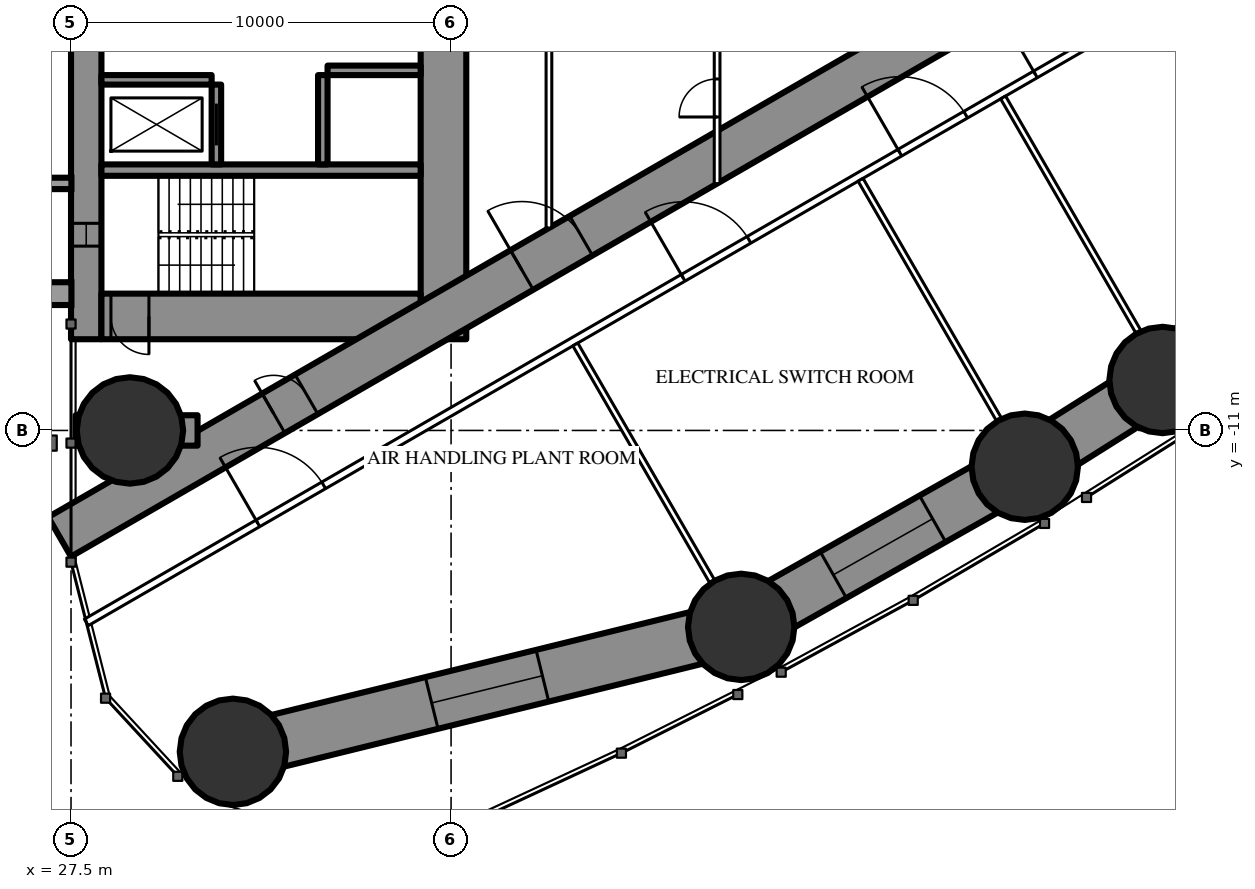
"""IFC4 building model, lengths in metres.
Left out: names, types, materials, properties, quantities, classifications, styles, units other than length and angle.
Written with IfcOpenShell. Run it as: python <this file> out.ifc"""

import sys

from ifc_helpers import new_model, si_unit, direction, frame, frame_2d, origin, origin_2d, place, context, subcontext, project, spatial, rectangle, circle, extrude, element, fill, save


model = new_model("IFC4")
c1 = context("Model", 3, precision=1e-05, world=origin(), true_north=direction((0.0, 1.0)))
c2 = subcontext(c1, "Body", "Model", "MODEL_VIEW")
j1 = project(units=[si_unit("LENGTHUNIT", "METRE"), si_unit("PLANEANGLEUNIT", "RADIAN")], contexts=[c1])
p1 = place(None, origin())
s1 = spatial("IfcSite", under=j1, at=p1, CompositionType="ELEMENT")
p2 = place(p1, origin())
s2 = spatial("IfcBuilding", under=s1, at=p2, CompositionType="ELEMENT")
p3 = place(p2, frame((0.0, 0.0, 201.8)))
s3 = spatial("IfcBuildingStorey", under=s2, at=p3, CompositionType="ELEMENT", Elevation=201.8)
for number, where, z_axis, x_axis in (
    (1, (31.76, -19.456, 0.0), (0.0, 0.0, 1.0), (1.0, 0.0, 0.0)),
    (2, (29.05, -11.0, 0.0), (0.0, 0.0, 1.0), (1.0, 0.0, 0.0)),
    (3, (45.134, -16.168, 0.0), (0.0, 0.0, 1.0), (1.0, 0.0, 0.0)),
    (4, (52.594, -11.955, 0.0), (0.0, 0.0, 1.0), (1.0, 0.0, 0.0)),
    (5, (56.221, -9.672, 0.0), (0.0, 0.0, 1.0), (1.0, 0.0, 0.0)),
):
    element("IfcColumn", number, at=place(p3, frame(where, z_axis=z_axis, x_axis=x_axis)), inside=s3, PredefinedType="COLUMN", context=c2, shape_type="SweptSolid", body=[
        extrude(circle(Radius=1.4, at=origin_2d()), origin(), (0.0, 0.0, 1.0), 3.5),
    ])
p4 = place(p3, frame((27.9, -8.6, 0.0), z_axis=(0.0, 0.0, 1.0), x_axis=(0.0, 1.0, 0.0)))
e6 = element("IfcWall", 6, at=p4, inside=s3, PredefinedType="SHEAR", context=c2, shape_type="SweptSolid", body=[
    extrude(rectangle(XDim=17.2, YDim=0.8, at=frame_2d((8.6, 0.0))), origin(), (0.0, 0.0, 1.0), 3.5),
])
p5 = place(p4, frame((2.45, 0.0, 0.6)))
e7 = element("IfcOpeningElement", 7, at=p5, cuts=e6, PredefinedType="OPENING", context=c2, shape_type="SweptSolid", body=[
    extrude(rectangle(XDim=0.6, YDim=2.1, at=frame_2d((0.3, 1.05))), frame((0.0, 0.41, 0.0), z_axis=(0.0, -1.0, 0.0), x_axis=(1.0, 0.0, 0.0)), (0.0, 0.0, 1.0), 0.82),
])
p6 = place(p4, frame((14.15, 0.0, 0.6)))
e8 = element("IfcOpeningElement", 8, at=p6, cuts=e6, PredefinedType="OPENING", context=c2, shape_type="SweptSolid", body=[
    extrude(rectangle(XDim=0.6, YDim=2.1, at=frame_2d((0.3, 1.05))), frame((0.0, 0.41, 0.0), z_axis=(0.0, -1.0, 0.0), x_axis=(1.0, 0.0, 0.0)), (0.0, 0.0, 1.0), 0.82),
])
p7 = place(p3, frame((37.3, -8.6, 0.0), z_axis=(0.0, 0.0, 1.0), x_axis=(0.0, 1.0, 0.0)))
e9 = element("IfcWall", 9, at=p7, inside=s3, PredefinedType="SHEAR", context=c2, shape_type="SweptSolid", body=[
    extrude(rectangle(XDim=17.2, YDim=1.2, at=frame_2d((8.6, 0.0))), origin(), (0.0, 0.0, 1.0), 3.5),
])
p8 = place(p7, frame((7.7, 0.0, 0.0)))
e10 = element("IfcOpeningElement", 10, at=p8, cuts=e9, PredefinedType="OPENING", context=c2, shape_type="SweptSolid", body=[
    extrude(rectangle(XDim=1.8, YDim=2.2, at=frame_2d((0.9, 1.1))), frame((0.0, 0.61, 0.0), z_axis=(0.0, -1.0, 0.0), x_axis=(1.0, 0.0, 0.0)), (0.0, 0.0, 1.0), 1.22),
])
p9 = place(p3, frame((28.3, -8.0, 0.0), z_axis=(0.0, 0.0, 1.0), x_axis=(1.0, 0.0, 0.0)))
e11 = element("IfcWall", 11, at=p9, inside=s3, PredefinedType="SHEAR", context=c2, shape_type="SweptSolid", body=[
    extrude(rectangle(XDim=8.4, YDim=1.2, at=frame_2d((4.2, 0.0))), origin(), (0.0, 0.0, 1.0), 3.5),
])
p10 = place(p9, frame((0.25, 0.0, 0.0)))
e12 = element("IfcOpeningElement", 12, at=p10, cuts=e11, PredefinedType="OPENING", context=c2, shape_type="SweptSolid", body=[
    extrude(rectangle(XDim=1.0, YDim=2.2, at=frame_2d((0.5, 1.1))), frame((0.0, 0.61, 0.0), z_axis=(0.0, -1.0, 0.0), x_axis=(1.0, 0.0, 0.0)), (0.0, 0.0, 1.0), 1.22),
])
p11 = place(p3, frame((28.3, -4.15, 0.0), z_axis=(0.0, 0.0, 1.0), x_axis=(1.0, 0.0, 0.0)))
e13 = element("IfcWall", 13, at=p11, inside=s3, PredefinedType="SHEAR", context=c2, shape_type="SweptSolid", body=[
    extrude(rectangle(XDim=8.4, YDim=0.3, at=frame_2d((4.2, 0.0))), origin(), (0.0, 0.0, 1.0), 3.5),
])
p12 = place(p3, frame((31.325, -4.0, 0.0), z_axis=(0.0, 0.0, 1.0), x_axis=(0.0, 1.0, 0.0)))
e14 = element("IfcWall", 14, at=p12, inside=s3, PredefinedType="SHEAR", context=c2, shape_type="SweptSolid", body=[
    extrude(rectangle(XDim=2.1, YDim=0.25, at=frame_2d((1.05, 0.0))), origin(), (0.0, 0.0, 1.0), 3.5),
])
p13 = place(p12, frame((0.5, 0.0, 0.0)))
e15 = element("IfcOpeningElement", 15, at=p13, cuts=e14, PredefinedType="OPENING", context=c2, shape_type="SweptSolid", body=[
    extrude(rectangle(XDim=1.1, YDim=2.2, at=frame_2d((0.55, 1.1))), frame((0.0, 0.135, 0.0), z_axis=(0.0, -1.0, 0.0), x_axis=(1.0, 0.0, 0.0)), (0.0, 0.0, 1.0), 0.27),
])
p14 = place(p3, frame((34.125, -4.0, 0.0), z_axis=(0.0, 0.0, 1.0), x_axis=(0.0, 1.0, 0.0)))
e16 = element("IfcWall", 16, at=p14, inside=s3, PredefinedType="SHEAR", context=c2, shape_type="SweptSolid", body=[
    extrude(rectangle(XDim=2.35, YDim=0.25, at=frame_2d((1.175, 0.0))), origin(), (0.0, 0.0, 1.0), 3.5),
])
p15 = place(p3, frame((28.3, -1.775, 0.0), z_axis=(0.0, 0.0, 1.0), x_axis=(1.0, 0.0, 0.0)))
e17 = element("IfcWall", 17, at=p15, inside=s3, PredefinedType="SHEAR", context=c2, shape_type="SweptSolid", body=[
    extrude(rectangle(XDim=2.9, YDim=0.25, at=frame_2d((1.45, 0.0))), origin(), (0.0, 0.0, 1.0), 3.5),
])
p16 = place(p3, frame((34.25, -1.525, 0.0), z_axis=(0.0, 0.0, 1.0), x_axis=(1.0, 0.0, 0.0)))
e18 = element("IfcWall", 18, at=p16, inside=s3, PredefinedType="SHEAR", context=c2, shape_type="SweptSolid", body=[
    extrude(rectangle(XDim=2.45, YDim=0.25, at=frame_2d((1.225, 0.0))), origin(), (0.0, 0.0, 1.0), 3.5),
])
p17 = place(p3, frame((27.2, -13.8, 0.0), z_axis=(0.0, 0.0, 1.0), x_axis=(0.866027159892, 0.499996958321, 0.0)))
e19 = element("IfcWall", 19, at=p17, inside=s3, PredefinedType="SHEAR", context=c2, shape_type="SweptSolid", body=[
    extrude(rectangle(XDim=27.947, YDim=1.2, at=frame_2d((13.973, 0.0))), origin(), (0.0, 0.0, 1.0), 3.5),
])
p18 = place(p17, frame((6.5, 0.0, 0.0)))
e20 = element("IfcOpeningElement", 20, at=p18, cuts=e19, PredefinedType="OPENING", context=c2, shape_type="SweptSolid", body=[
    extrude(rectangle(XDim=1.0, YDim=2.2, at=frame_2d((0.5, 1.1))), frame((0.0, 0.61, 0.0), z_axis=(0.0, -1.0, 0.0), x_axis=(1.0, 0.0, 0.0)), (0.0, 0.0, 1.0), 1.22),
])
p19 = place(p17, frame((14.045, 0.0, 0.0)))
e21 = element("IfcOpeningElement", 21, at=p19, cuts=e19, PredefinedType="OPENING", context=c2, shape_type="SweptSolid", body=[
    extrude(rectangle(XDim=1.8, YDim=2.2, at=frame_2d((0.9, 1.1))), frame((0.0, 0.61, 0.0), z_axis=(0.0, -1.0, 0.0), x_axis=(1.0, 0.0, 0.0)), (0.0, 0.0, 1.0), 1.22),
])
p20 = place(p3, frame((27.62, -11.0, 0.0), z_axis=(0.0, 0.0, 1.0), x_axis=(1.0, 0.0, 0.0)))
e22 = element("IfcWall", 22, at=p20, inside=s3, PredefinedType="SHEAR", context=c2, shape_type="SweptSolid", body=[
    extrude(rectangle(XDim=3.209, YDim=0.8, at=frame_2d((1.605, 0.0))), origin(), (0.0, 0.0, 1.0), 3.5),
])
p21 = place(p3, frame((31.76, -19.456, 0.0), z_axis=(0.0, 0.0, 1.0), x_axis=(0.971093253227, 0.238700426344, 0.0)))
e23 = element("IfcWall", 23, at=p21, inside=s3, PredefinedType="SHEAR", context=c2, shape_type="SweptSolid", body=[
    extrude(rectangle(XDim=13.772, YDim=1.4, at=frame_2d((6.886, 0.0))), origin(), (0.0, 0.0, 1.0), 3.5),
])
p22 = place(p21, frame((5.386, 0.0, 0.6)))
e24 = element("IfcOpeningElement", 24, at=p22, cuts=e23, PredefinedType="OPENING", context=c2, shape_type="SweptSolid", body=[
    extrude(rectangle(XDim=3.0, YDim=1.2, at=frame_2d((1.5, 0.6))), frame((0.0, 0.71, 0.0), z_axis=(0.0, -1.0, 0.0), x_axis=(1.0, 0.0, 0.0)), (0.0, 0.0, 1.0), 1.42),
])
p23 = place(p3, frame((45.134, -16.168, 0.0), z_axis=(0.0, 0.0, 1.0), x_axis=(0.870721990329, 0.491775574381, 0.0)))
e25 = element("IfcWall", 25, at=p23, inside=s3, PredefinedType="SHEAR", context=c2, shape_type="SweptSolid", body=[
    extrude(rectangle(XDim=8.569, YDim=1.4, at=frame_2d((4.284, 0.0))), origin(), (0.0, 0.0, 1.0), 3.5),
])
p24 = place(p23, frame((2.784, 0.0, 0.6)))
e26 = element("IfcOpeningElement", 26, at=p24, cuts=e25, PredefinedType="OPENING", context=c2, shape_type="SweptSolid", body=[
    extrude(rectangle(XDim=3.0, YDim=1.2, at=frame_2d((1.5, 0.6))), frame((0.0, 0.71, 0.0), z_axis=(0.0, -1.0, 0.0), x_axis=(1.0, 0.0, 0.0)), (0.0, 0.0, 1.0), 1.42),
])
p25 = place(p3, frame((52.594, -11.955, 0.0), z_axis=(0.0, 0.0, 1.0), x_axis=(0.846348902569, 0.532628890617, 0.0)))
e27 = element("IfcWall", 27, at=p25, inside=s3, PredefinedType="SHEAR", context=c2, shape_type="SweptSolid", body=[
    extrude(rectangle(XDim=4.285, YDim=1.4, at=frame_2d((2.143, 0.0))), origin(), (0.0, 0.0, 1.0), 3.5),
])
p26 = place(p3, frame((56.221, -9.672, 0.0), z_axis=(0.0, 0.0, 1.0), x_axis=(0.697649905443, 0.716438838587, 0.0)))
e28 = element("IfcWall", 28, at=p26, inside=s3, PredefinedType="SHEAR", context=c2, shape_type="SweptSolid", body=[
    extrude(rectangle(XDim=13.501, YDim=1.4, at=frame_2d((6.75, 0.0))), origin(), (0.0, 0.0, 1.0), 3.5),
])
p27 = place(p26, frame((5.25, 0.0, 0.6)))
e29 = element("IfcOpeningElement", 29, at=p27, cuts=e28, PredefinedType="OPENING", context=c2, shape_type="SweptSolid", body=[
    extrude(rectangle(XDim=3.0, YDim=1.2, at=frame_2d((1.5, 0.6))), frame((0.0, 0.71, 0.0), z_axis=(0.0, -1.0, 0.0), x_axis=(1.0, 0.0, 0.0)), (0.0, 0.0, 1.0), 1.42),
])
p28 = place(p3, frame((27.903, -16.05, 0.0), z_axis=(0.0, 0.0, 1.0), x_axis=(0.866022581743, 0.500004887887, 0.0)))
e30 = element("IfcWall", 30, at=p28, inside=s3, PredefinedType="PARTITIONING", context=c2, shape_type="SweptSolid", body=[
    extrude(rectangle(XDim=32.1, YDim=0.2, at=frame_2d((16.05, 0.0))), origin(), (0.0, 0.0, 1.0), 3.25),
])
p29 = place(p28, frame((5.212, 0.0, 0.0)))
e31 = element("IfcOpeningElement", 31, at=p29, cuts=e30, PredefinedType="OPENING", context=c2, shape_type="SweptSolid", body=[
    extrude(rectangle(XDim=2.0, YDim=2.4, at=frame_2d((1.0, 1.2))), frame((0.0, 0.11, 0.0), z_axis=(0.0, -1.0, 0.0), x_axis=(1.0, 0.0, 0.0)), (0.0, 0.0, 1.0), 0.22),
])
p30 = place(p28, frame((18.133, 0.0, 0.0)))
e32 = element("IfcOpeningElement", 32, at=p30, cuts=e30, PredefinedType="OPENING", context=c2, shape_type="SweptSolid", body=[
    extrude(rectangle(XDim=2.0, YDim=2.4, at=frame_2d((1.0, 1.2))), frame((0.0, 0.11, 0.0), z_axis=(0.0, -1.0, 0.0), x_axis=(1.0, 0.0, 0.0)), (0.0, 0.0, 1.0), 0.22),
])
p31 = place(p28, frame((24.717, 0.0, 0.0)))
e33 = element("IfcOpeningElement", 33, at=p31, cuts=e30, PredefinedType="OPENING", context=c2, shape_type="SweptSolid", body=[
    extrude(rectangle(XDim=2.0, YDim=2.4, at=frame_2d((1.0, 1.2))), frame((0.0, 0.11, 0.0), z_axis=(0.0, -1.0, 0.0), x_axis=(1.0, 0.0, 0.0)), (0.0, 0.0, 1.0), 0.22),
])
p32 = place(p28, frame((28.836, 0.0, 0.0)))
e34 = element("IfcOpeningElement", 34, at=p32, cuts=e30, PredefinedType="OPENING", context=c2, shape_type="SweptSolid", body=[
    extrude(rectangle(XDim=2.0, YDim=2.4, at=frame_2d((1.0, 1.2))), frame((0.0, 0.11, 0.0), z_axis=(0.0, -1.0, 0.0), x_axis=(1.0, 0.0, 0.0)), (0.0, 0.0, 1.0), 0.22),
])
p33 = place(p3, frame((40.769, -8.737, 0.0), z_axis=(0.0, 0.0, 1.0), x_axis=(0.500013115284, -0.866017831539, 0.0)))
e35 = element("IfcWall", 35, at=p33, inside=s3, PredefinedType="PARTITIONING", context=c2, shape_type="SweptSolid", body=[
    extrude(rectangle(XDim=7.198, YDim=0.15, at=frame_2d((3.599, 0.0))), origin(), (0.0, 0.0, 1.0), 2.05),
])
p34 = place(p3, frame((48.275, -4.404, 0.0), z_axis=(0.0, 0.0, 1.0), x_axis=(0.500006004368, -0.866021937133, 0.0)))
e36 = element("IfcWall", 36, at=p34, inside=s3, PredefinedType="PARTITIONING", context=c2, shape_type="SweptSolid", body=[
    extrude(rectangle(XDim=7.279, YDim=0.15, at=frame_2d((3.64, 0.0))), origin(), (0.0, 0.0, 1.0), 2.05),
])
p35 = place(p3, frame((52.025, -2.238, 0.0), z_axis=(0.0, 0.0, 1.0), x_axis=(0.499983785035, -0.866034765296, 0.0)))
e37 = element("IfcWall", 37, at=p35, inside=s3, PredefinedType="PARTITIONING", context=c2, shape_type="SweptSolid", body=[
    extrude(rectangle(XDim=7.116, YDim=0.15, at=frame_2d((3.558, 0.0))), origin(), (0.0, 0.0, 1.0), 2.05),
])
p36 = place(p3, frame((40.075, -5.674, 0.0), z_axis=(0.0, 0.0, 1.0), x_axis=(0.0, 1.0, 0.0)))
e38 = element("IfcWall", 38, at=p36, inside=s3, PredefinedType="PARTITIONING", context=c2, shape_type="SweptSolid", body=[
    extrude(rectangle(XDim=11.348, YDim=0.15, at=frame_2d((5.674, 0.0))), origin(), (0.0, 0.0, 1.0), 3.25),
])
p37 = place(p36, frame((4.774, 0.0, 0.0)))
e39 = element("IfcOpeningElement", 39, at=p37, cuts=e38, PredefinedType="OPENING", context=c2, shape_type="SweptSolid", body=[
    extrude(rectangle(XDim=1.8, YDim=2.2, at=frame_2d((0.9, 1.1))), frame((0.0, 0.085, 0.0), z_axis=(0.0, -1.0, 0.0), x_axis=(1.0, 0.0, 0.0)), (0.0, 0.0, 1.0), 0.17),
])
p38 = place(p3, frame((44.5, -4.505, 0.0), z_axis=(0.0, 0.0, 1.0), x_axis=(0.0, 1.0, 0.0)))
e40 = element("IfcWall", 40, at=p38, inside=s3, PredefinedType="PARTITIONING", context=c2, shape_type="SweptSolid", body=[
    extrude(rectangle(XDim=9.009, YDim=0.15, at=frame_2d((4.505, 0.0))), origin(), (0.0, 0.0, 1.0), 3.25),
])
p39 = place(p38, frame((1.752, 0.0, 0.0)))
e41 = element("IfcOpeningElement", 41, at=p39, cuts=e40, PredefinedType="OPENING", context=c2, shape_type="SweptSolid", body=[
    extrude(rectangle(XDim=1.0, YDim=2.2, at=frame_2d((0.5, 1.1))), frame((0.0, 0.085, 0.0), z_axis=(0.0, -1.0, 0.0), x_axis=(1.0, 0.0, 0.0)), (0.0, 0.0, 1.0), 0.17),
])
p40 = place(p38, frame((6.257, 0.0, 0.0)))
e42 = element("IfcOpeningElement", 42, at=p40, cuts=e40, PredefinedType="OPENING", context=c2, shape_type="SweptSolid", body=[
    extrude(rectangle(XDim=1.0, YDim=2.2, at=frame_2d((0.5, 1.1))), frame((0.0, 0.085, 0.0), z_axis=(0.0, -1.0, 0.0), x_axis=(1.0, 0.0, 0.0)), (0.0, 0.0, 1.0), 0.17),
])
p41 = place(p22, origin())
e43 = element("IfcWindow", 43, at=p41, inside=s3, PartitioningType="SINGLE_PANEL", PredefinedType="WINDOW", context=c2, shape_type="SweptSolid", body=[
    extrude(rectangle(XDim=3.0, YDim=1.2, at=frame_2d((1.5, 0.6))), frame((0.0, 0.03, 0.0), z_axis=(0.0, -1.0, 0.0), x_axis=(1.0, 0.0, 0.0)), (0.0, 0.0, 1.0), 0.06),
])
fill(e24, e43)
p42 = place(p24, origin())
e44 = element("IfcWindow", 44, at=p42, inside=s3, PartitioningType="SINGLE_PANEL", PredefinedType="WINDOW", context=c2, shape_type="SweptSolid", body=[
    extrude(rectangle(XDim=3.0, YDim=1.2, at=frame_2d((1.5, 0.6))), frame((0.0, 0.03, 0.0), z_axis=(0.0, -1.0, 0.0), x_axis=(1.0, 0.0, 0.0)), (0.0, 0.0, 1.0), 0.06),
])
fill(e26, e44)
p43 = place(p29, origin())
e45 = element("IfcDoor", 45, at=p43, inside=s3, OperationType="DOUBLE_DOOR_SINGLE_SWING", PredefinedType="DOOR", context=c2, shape_type="SweptSolid", body=[
    extrude(rectangle(XDim=2.0, YDim=2.4, at=frame_2d((1.0, 1.2))), frame((0.0, 0.025, 0.0), z_axis=(0.0, -1.0, 0.0), x_axis=(1.0, 0.0, 0.0)), (0.0, 0.0, 1.0), 0.05),
])
fill(e31, e45)
p44 = place(p30, origin())
e46 = element("IfcDoor", 46, at=p44, inside=s3, OperationType="DOUBLE_DOOR_SINGLE_SWING", PredefinedType="DOOR", context=c2, shape_type="SweptSolid", body=[
    extrude(rectangle(XDim=2.0, YDim=2.4, at=frame_2d((1.0, 1.2))), frame((0.0, 0.025, 0.0), z_axis=(0.0, -1.0, 0.0), x_axis=(1.0, 0.0, 0.0)), (0.0, 0.0, 1.0), 0.05),
])
fill(e32, e46)
p45 = place(p31, origin())
e47 = element("IfcDoor", 47, at=p45, inside=s3, OperationType="DOUBLE_DOOR_SINGLE_SWING", PredefinedType="DOOR", context=c2, shape_type="SweptSolid", body=[
    extrude(rectangle(XDim=2.0, YDim=2.4, at=frame_2d((1.0, 1.2))), frame((0.0, 0.025, 0.0), z_axis=(0.0, -1.0, 0.0), x_axis=(1.0, 0.0, 0.0)), (0.0, 0.0, 1.0), 0.05),
])
fill(e33, e47)
p46 = place(p32, origin())
e48 = element("IfcDoor", 48, at=p46, inside=s3, OperationType="DOUBLE_DOOR_SINGLE_SWING", PredefinedType="DOOR", context=c2, shape_type="SweptSolid", body=[
    extrude(rectangle(XDim=2.0, YDim=2.4, at=frame_2d((1.0, 1.2))), frame((0.0, 0.025, 0.0), z_axis=(0.0, -1.0, 0.0), x_axis=(1.0, 0.0, 0.0)), (0.0, 0.0, 1.0), 0.05),
])
fill(e34, e48)
p47 = place(p39, origin())
e49 = element("IfcDoor", 49, at=p47, inside=s3, OperationType="SINGLE_SWING_LEFT", PredefinedType="DOOR", context=c2, shape_type="SweptSolid", body=[
    extrude(rectangle(XDim=1.0, YDim=2.2, at=frame_2d((0.5, 1.1))), frame((0.0, 0.025, 0.0), z_axis=(0.0, -1.0, 0.0), x_axis=(1.0, 0.0, 0.0)), (0.0, 0.0, 1.0), 0.05),
])
fill(e41, e49)
p48 = place(p18, origin())
e50 = element("IfcDoor", 50, at=p48, inside=s3, OperationType="SINGLE_SWING_LEFT", PredefinedType="DOOR", context=c2, shape_type="SweptSolid", body=[
    extrude(rectangle(XDim=1.0, YDim=2.2, at=frame_2d((0.5, 1.1))), frame((0.0, 0.025, 0.0), z_axis=(0.0, -1.0, 0.0), x_axis=(1.0, 0.0, 0.0)), (0.0, 0.0, 1.0), 0.05),
])
fill(e20, e50)
p49 = place(p19, origin())
e51 = element("IfcDoor", 51, at=p49, inside=s3, OperationType="DOUBLE_DOOR_SINGLE_SWING", PredefinedType="DOOR", context=c2, shape_type="SweptSolid", body=[
    extrude(rectangle(XDim=1.8, YDim=2.2, at=frame_2d((0.9, 1.1))), frame((0.0, 0.025, 0.0), z_axis=(0.0, -1.0, 0.0), x_axis=(1.0, 0.0, 0.0)), (0.0, 0.0, 1.0), 0.05),
])
fill(e21, e51)
p50 = place(p10, origin())
e52 = element("IfcDoor", 52, at=p50, inside=s3, OperationType="SINGLE_SWING_RIGHT", PredefinedType="DOOR", context=c2, shape_type="SweptSolid", body=[
    extrude(rectangle(XDim=1.0, YDim=2.2, at=frame_2d((0.5, 1.1))), frame((0.0, 0.025, 0.0), z_axis=(0.0, -1.0, 0.0), x_axis=(1.0, 0.0, 0.0)), (0.0, 0.0, 1.0), 0.05),
])
fill(e12, e52)
p51 = place(p13, origin())
e53 = element("IfcDoor", 53, at=p51, inside=s3, OperationType="SLIDING_TO_LEFT", PredefinedType="USERDEFINED", context=c2, shape_type="SweptSolid", body=[
    extrude(rectangle(XDim=1.1, YDim=2.2, at=frame_2d((0.55, 1.1))), frame((0.0, 0.025, 0.0), z_axis=(0.0, -1.0, 0.0), x_axis=(1.0, 0.0, 0.0)), (0.0, 0.0, 1.0), 0.05),
])
fill(e15, e53)
p52 = place(p5, origin())
e54 = element("IfcWindow", 54, at=p52, inside=s3, PartitioningType="SINGLE_PANEL", PredefinedType="WINDOW", context=c2, shape_type="SweptSolid", body=[
    extrude(rectangle(XDim=0.6, YDim=2.1, at=frame_2d((0.3, 1.05))), frame((0.0, 0.03, 0.0), z_axis=(0.0, -1.0, 0.0), x_axis=(1.0, 0.0, 0.0)), (0.0, 0.0, 1.0), 0.06),
])
fill(e7, e54)
save(model, sys.argv[1])
